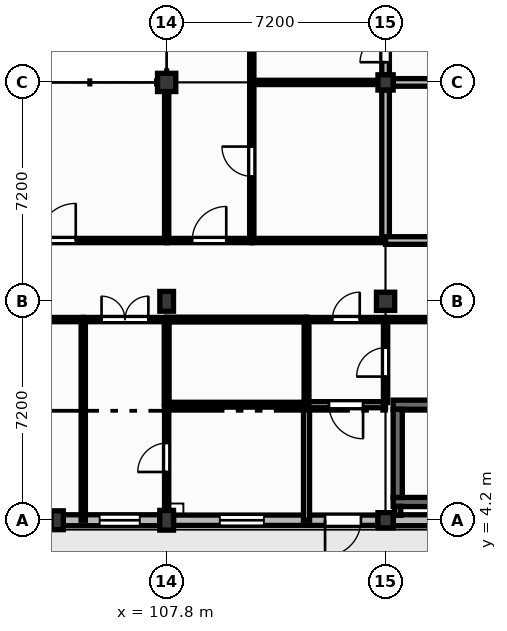
"""IFC4 building model, lengths in metres.
Left out: names, types, materials, properties, quantities, classifications, styles, units other than length and angle.
Written with IfcOpenShell. Run it as: python <this file> out.ifc"""

import sys

from ifc_helpers import new_model, si_unit, direction, frame, frame_2d, origin, origin_2d, place, context, subcontext, project, spatial, rectangle, extrude, element, fill, save


model = new_model("IFC4")
c1 = context("Model", 3, precision=1e-05, world=origin(), true_north=direction((0.0, 1.0)))
c2 = subcontext(c1, "Body", "Model", "MODEL_VIEW")
j1 = project(units=[si_unit("LENGTHUNIT", "METRE"), si_unit("PLANEANGLEUNIT", "RADIAN")], contexts=[c1])
p1 = place(None, origin())
s1 = spatial("IfcSite", under=j1, at=p1, CompositionType="ELEMENT")
p2 = place(p1, origin())
s2 = spatial("IfcBuilding", under=s1, at=p2, CompositionType="ELEMENT")
p3 = place(p2, origin())
s3 = spatial("IfcBuildingStorey", under=s2, at=p3, CompositionType="ELEMENT", Elevation=0.0)
for number, where, z_axis, x_axis in (
    (1, (107.8, 4.2, 0.0), (0.0, 0.0, 1.0), (1.0, 0.0, 0.0)),
    (2, (107.8, 11.4, 0.0), (0.0, 0.0, 1.0), (1.0, 0.0, 0.0)),
):
    element("IfcColumn", number, at=place(p3, frame(where, z_axis=z_axis, x_axis=x_axis)), inside=s3, PredefinedType="COLUMN", context=c2, shape_type="SweptSolid", body=[
        extrude(rectangle(XDim=0.45, YDim=0.65, at=origin_2d()), origin(), (0.0, 0.0, 1.0), 4.2),
    ])
p4 = place(p3, frame((107.8, 18.6, 0.0), z_axis=(0.0, 0.0, 1.0), x_axis=(1.0, 0.0, 0.0)))
e3 = element("IfcColumn", 3, at=p4, inside=s3, PredefinedType="COLUMN", context=c2, shape_type="SweptSolid", body=[
    extrude(rectangle(XDim=0.6, YDim=0.6, at=origin_2d()), origin(), (0.0, 0.0, 1.0), 4.2),
])
p5 = place(p3, frame((115.0, 4.2, 0.0), z_axis=(0.0, 0.0, 1.0), x_axis=(1.0, 0.0, 0.0)))
e4 = element("IfcColumn", 4, at=p5, inside=s3, PredefinedType="COLUMN", context=c2, shape_type="SweptSolid", body=[
    extrude(rectangle(XDim=0.5, YDim=0.5, at=origin_2d()), origin(), (0.0, 0.0, 1.0), 4.2),
])
p6 = place(p3, frame((115.0, 11.4, 0.0), z_axis=(0.0, 0.0, 1.0), x_axis=(1.0, 0.0, 0.0)))
e5 = element("IfcColumn", 5, at=p6, inside=s3, PredefinedType="COLUMN", context=c2, shape_type="SweptSolid", body=[
    extrude(rectangle(XDim=0.6, YDim=0.6, at=origin_2d()), origin(), (0.0, 0.0, 1.0), 4.2),
])
p7 = place(p3, frame((115.0, 18.6, 0.0), z_axis=(0.0, 0.0, 1.0), x_axis=(1.0, 0.0, 0.0)))
e6 = element("IfcColumn", 6, at=p7, inside=s3, PredefinedType="COLUMN", context=c2, shape_type="SweptSolid", body=[
    extrude(rectangle(XDim=0.5, YDim=0.5, at=origin_2d()), origin(), (0.0, 0.0, 1.0), 4.2),
])
p8 = place(p3, frame((104.2, 4.2, 0.0), z_axis=(0.0, 0.0, 1.0), x_axis=(1.0, 0.0, 0.0)))
e7 = element("IfcColumn", 7, at=p8, inside=s3, PredefinedType="PILASTER", context=c2, shape_type="SweptSolid", body=[
    extrude(rectangle(XDim=0.4, YDim=0.62, at=origin_2d()), origin(), (0.0, 0.0, 1.0), 4.2),
])
p9 = place(p3, frame((104.4, 4.2, 0.0), z_axis=(0.0, 0.0, 1.0), x_axis=(1.0, 0.0, 0.0)))
e8 = element("IfcWall", 8, at=p9, inside=s3, PredefinedType="SOLIDWALL", context=c2, shape_type="SweptSolid", body=[
    extrude(rectangle(XDim=3.175, YDim=0.36, at=frame_2d((1.587, 0.0))), origin(), (0.0, 0.0, 1.0), 3.68),
])
p10 = place(p9, frame((1.196, 0.0, 1.5)))
e9 = element("IfcOpeningElement", 9, at=p10, cuts=e8, PredefinedType="OPENING", context=c2, shape_type="SweptSolid", body=[
    extrude(rectangle(XDim=1.32, YDim=1.25, at=frame_2d((0.66, 0.625))), frame((0.0, 0.19, 0.0), z_axis=(0.0, -1.0, 0.0), x_axis=(1.0, 0.0, 0.0)), (0.0, 0.0, 1.0), 0.38),
])
p11 = place(p3, frame((108.025, 4.2, 0.0), z_axis=(0.0, 0.0, 1.0), x_axis=(1.0, 0.0, 0.0)))
e10 = element("IfcWall", 10, at=p11, inside=s3, PredefinedType="SOLIDWALL", context=c2, shape_type="SweptSolid", body=[
    extrude(rectangle(XDim=6.725, YDim=0.34, at=frame_2d((3.363, 0.0))), origin(), (0.0, 0.0, 1.0), 3.68),
])
p12 = place(p11, frame((4.985, 0.0, 0.0)))
e11 = element("IfcOpeningElement", 11, at=p12, cuts=e10, PredefinedType="OPENING", context=c2, shape_type="SweptSolid", body=[
    extrude(rectangle(XDim=1.18, YDim=2.2, at=frame_2d((0.59, 1.1))), frame((0.0, 0.18, 0.0), z_axis=(0.0, -1.0, 0.0), x_axis=(1.0, 0.0, 0.0)), (0.0, 0.0, 1.0), 0.36),
])
p13 = place(p11, frame((1.522, 0.0, 1.35)))
e12 = element("IfcOpeningElement", 12, at=p13, cuts=e10, PredefinedType="OPENING", context=c2, shape_type="SweptSolid", body=[
    extrude(rectangle(XDim=1.45, YDim=1.4, at=frame_2d((0.725, 0.7))), frame((0.0, 0.18, 0.0), z_axis=(0.0, -1.0, 0.0), x_axis=(1.0, 0.0, 0.0)), (0.0, 0.0, 1.0), 0.36),
])
p14 = place(p3, frame((115.25, 4.2, 0.0), z_axis=(0.0, 0.0, 1.0), x_axis=(1.0, 0.0, 0.0)))
e13 = element("IfcWall", 13, at=p14, inside=s3, PredefinedType="SOLIDWALL", context=c2, shape_type="SweptSolid", body=[
    extrude(rectangle(XDim=6.65, YDim=0.36, at=frame_2d((3.325, 0.0))), origin(), (0.0, 0.0, 1.0), 3.68),
])
for number, where, z_axis, x_axis in (
    (14, (115.25, 4.8, 0.0), (0.0, 0.0, 1.0), (1.0, 0.0, 0.0)),
    (15, (115.25, 8.0, 0.0), (0.0, 0.0, 1.0), (1.0, 0.0, 0.0)),
):
    element("IfcWall", number, at=place(p3, frame(where, z_axis=z_axis, x_axis=x_axis)), inside=s3, PredefinedType="SHEAR", context=c2, shape_type="SweptSolid", body=[
        extrude(rectangle(XDim=6.7, YDim=0.3, at=frame_2d((3.35, 0.0))), origin(), (0.0, 0.0, 1.0), 4.25),
    ])
p15 = place(p3, frame((115.4, 4.95, 0.0), z_axis=(0.0, 0.0, 1.0), x_axis=(0.0, 1.0, 0.0)))
e16 = element("IfcWall", 16, at=p15, inside=s3, PredefinedType="SHEAR", context=c2, shape_type="SweptSolid", body=[
    extrude(rectangle(XDim=2.9, YDim=0.3, at=frame_2d((1.45, 0.0))), origin(), (0.0, 0.0, 1.0), 4.25),
])
p16 = place(p3, frame((100.6, 10.8, 0.0), z_axis=(0.0, 0.0, 1.0), x_axis=(1.0, 0.0, 0.0)))
e17 = element("IfcWall", 17, at=p16, inside=s3, PredefinedType="PARTITIONING", context=c2, shape_type="SweptSolid", body=[
    extrude(rectangle(XDim=4.457, YDim=0.14, at=frame_2d((2.229, 0.0))), origin(), (0.0, 0.0, 1.0), 4.18),
])
p17 = place(p16, frame((1.698, 0.0, 0.0)))
e18 = element("IfcOpeningElement", 18, at=p17, cuts=e17, PredefinedType="OPENING", context=c2, shape_type="SweptSolid", body=[
    extrude(rectangle(XDim=1.06, YDim=2.15, at=frame_2d((0.53, 1.075))), frame((0.0, 0.08, 0.0), z_axis=(0.0, -1.0, 0.0), x_axis=(1.0, 0.0, 0.0)), (0.0, 0.0, 1.0), 0.16),
])
p18 = place(p3, frame((100.6, 13.4, 0.0), z_axis=(0.0, 0.0, 1.0), x_axis=(1.0, 0.0, 0.0)))
e19 = element("IfcWall", 19, at=p18, inside=s3, PredefinedType="PARTITIONING", context=c2, shape_type="SweptSolid", body=[
    extrude(rectangle(XDim=7.2, YDim=0.14, at=frame_2d((3.6, 0.0))), origin(), (0.0, 0.0, 1.0), 4.18),
])
p19 = place(p18, frame((2.99, 0.0, 0.0)))
e20 = element("IfcOpeningElement", 20, at=p19, cuts=e19, PredefinedType="OPENING", context=c2, shape_type="SweptSolid", body=[
    extrude(rectangle(XDim=1.22, YDim=2.1, at=frame_2d((0.61, 1.05))), frame((0.0, 0.08, 0.0), z_axis=(0.0, -1.0, 0.0), x_axis=(1.0, 0.0, 0.0)), (0.0, 0.0, 1.0), 0.16),
])
p20 = place(p3, frame((105.057, 4.2, 0.0), z_axis=(0.0, 0.0, 1.0), x_axis=(0.0, 1.0, 0.0)))
e21 = element("IfcWall", 21, at=p20, inside=s3, PredefinedType="PARTITIONING", context=c2, shape_type="SweptSolid", body=[
    extrude(rectangle(XDim=6.53, YDim=0.14, at=frame_2d((3.265, 0.0))), origin(), (0.0, 0.0, 1.0), 4.18),
])
p21 = place(p3, frame((105.057, 10.8, 0.0), z_axis=(0.0, 0.0, 1.0), x_axis=(1.0, 0.0, 0.0)))
e22 = element("IfcWall", 22, at=p21, inside=s3, PredefinedType="PARTITIONING", context=c2, shape_type="SweptSolid", body=[
    extrude(rectangle(XDim=2.743, YDim=0.14, at=frame_2d((1.372, 0.0))), origin(), (0.0, 0.0, 1.0), 4.18),
])
p22 = place(p21, frame((0.602, 0.0, 0.0)))
e23 = element("IfcOpeningElement", 23, at=p22, cuts=e22, PredefinedType="OPENING", context=c2, shape_type="SweptSolid", body=[
    extrude(rectangle(XDim=1.54, YDim=2.25, at=frame_2d((0.77, 1.125))), frame((0.0, 0.08, 0.0), z_axis=(0.0, -1.0, 0.0), x_axis=(1.0, 0.0, 0.0)), (0.0, 0.0, 1.0), 0.16),
])
p23 = place(p3, frame((107.8, 4.525, 0.0), z_axis=(0.0, 0.0, 1.0), x_axis=(0.0, 1.0, 0.0)))
e24 = element("IfcWall", 24, at=p23, inside=s3, PredefinedType="PARTITIONING", context=c2, shape_type="SweptSolid", body=[
    extrude(rectangle(XDim=3.475, YDim=0.14, at=frame_2d((1.738, 0.0))), origin(), (0.0, 0.0, 1.0), 3.5),
])
p24 = place(p23, frame((1.262, 0.0, 0.0)))
e25 = element("IfcOpeningElement", 25, at=p24, cuts=e24, PredefinedType="OPENING", context=c2, shape_type="SweptSolid", body=[
    extrude(rectangle(XDim=0.95, YDim=2.1, at=frame_2d((0.475, 1.05))), frame((0.0, 0.08, 0.0), z_axis=(0.0, -1.0, 0.0), x_axis=(1.0, 0.0, 0.0)), (0.0, 0.0, 1.0), 0.16),
])
p25 = place(p3, frame((107.8, 13.47, 0.0), z_axis=(0.0, 0.0, 1.0), x_axis=(0.0, 1.0, 0.0)))
e26 = element("IfcWall", 26, at=p25, inside=s3, PredefinedType="PARTITIONING", context=c2, shape_type="SweptSolid", body=[
    extrude(rectangle(XDim=4.83, YDim=0.14, at=frame_2d((2.415, 0.0))), origin(), (0.0, 0.0, 1.0), 3.5),
])
p26 = place(p3, frame((107.8, 13.4, 0.0), z_axis=(0.0, 0.0, 1.0), x_axis=(1.0, 0.0, 0.0)))
e27 = element("IfcWall", 27, at=p26, inside=s3, PredefinedType="PARTITIONING", context=c2, shape_type="SweptSolid", body=[
    extrude(rectangle(XDim=2.8, YDim=0.14, at=frame_2d((1.4, 0.0))), origin(), (0.0, 0.0, 1.0), 4.18),
])
p27 = place(p26, frame((0.84, 0.0, 0.0)))
e28 = element("IfcOpeningElement", 28, at=p27, cuts=e27, PredefinedType="OPENING", context=c2, shape_type="SweptSolid", body=[
    extrude(rectangle(XDim=1.12, YDim=2.15, at=frame_2d((0.56, 1.075))), frame((0.0, 0.08, 0.0), z_axis=(0.0, -1.0, 0.0), x_axis=(1.0, 0.0, 0.0)), (0.0, 0.0, 1.0), 0.16),
])
p28 = place(p3, frame((110.6, 13.47, 0.0), z_axis=(0.0, 0.0, 1.0), x_axis=(0.0, 1.0, 0.0)))
e29 = element("IfcWall", 29, at=p28, inside=s3, PredefinedType="PARTITIONING", context=c2, shape_type="SweptSolid", body=[
    extrude(rectangle(XDim=5.06, YDim=0.14, at=frame_2d((2.53, 0.0))), origin(), (0.0, 0.0, 1.0), 4.18),
])
p29 = place(p28, frame((2.04, 0.0, 0.0)))
e30 = element("IfcOpeningElement", 30, at=p29, cuts=e29, PredefinedType="OPENING", context=c2, shape_type="SweptSolid", body=[
    extrude(rectangle(XDim=0.98, YDim=2.15, at=frame_2d((0.49, 1.075))), frame((0.0, 0.08, 0.0), z_axis=(0.0, -1.0, 0.0), x_axis=(1.0, 0.0, 0.0)), (0.0, 0.0, 1.0), 0.16),
])
p30 = place(p3, frame((110.6, 13.4, 0.0), z_axis=(0.0, 0.0, 1.0), x_axis=(1.0, 0.0, 0.0)))
e31 = element("IfcWall", 31, at=p30, inside=s3, PredefinedType="PARTITIONING", context=c2, shape_type="SweptSolid", body=[
    extrude(rectangle(XDim=4.4, YDim=0.14, at=frame_2d((2.2, 0.0))), origin(), (0.0, 0.0, 1.0), 4.18),
])
p31 = place(p3, frame((110.6, 18.67, 0.0), z_axis=(0.0, 0.0, 1.0), x_axis=(0.0, 1.0, 0.0)))
e32 = element("IfcWall", 32, at=p31, inside=s3, PredefinedType="PARTITIONING", context=c2, shape_type="SweptSolid", body=[
    extrude(rectangle(XDim=8.46, YDim=0.14, at=frame_2d((4.23, 0.0))), origin(), (0.0, 0.0, 1.0), 4.18),
])
p32 = place(p31, frame((3.67, 0.0, 0.0)))
e33 = element("IfcOpeningElement", 33, at=p32, cuts=e32, PredefinedType="OPENING", context=c2, shape_type="SweptSolid", body=[
    extrude(rectangle(XDim=1.12, YDim=2.15, at=frame_2d((0.56, 1.075))), frame((0.0, 0.08, 0.0), z_axis=(0.0, -1.0, 0.0), x_axis=(1.0, 0.0, 0.0)), (0.0, 0.0, 1.0), 0.16),
])
p33 = place(p3, frame((110.6, 18.6, 0.0), z_axis=(0.0, 0.0, 1.0), x_axis=(1.0, 0.0, 0.0)))
e34 = element("IfcWall", 34, at=p33, inside=s3, PredefinedType="PARTITIONING", context=c2, shape_type="SweptSolid", body=[
    extrude(rectangle(XDim=4.15, YDim=0.14, at=frame_2d((2.075, 0.0))), origin(), (0.0, 0.0, 1.0), 3.25),
])
p34 = place(p3, frame((112.4, 4.2, 0.0), z_axis=(0.0, 0.0, 1.0), x_axis=(0.0, 1.0, 0.0)))
e35 = element("IfcWall", 35, at=p34, inside=s3, PredefinedType="PARTITIONING", context=c2, shape_type="SweptSolid", body=[
    extrude(rectangle(XDim=3.73, YDim=0.2, at=frame_2d((1.865, 0.0))), origin(), (0.0, 0.0, 1.0), 4.18),
])
p35 = place(p3, frame((112.4, 8.0, 0.0), z_axis=(0.0, 0.0, 1.0), x_axis=(1.0, 0.0, 0.0)))
e36 = element("IfcWall", 36, at=p35, inside=s3, PredefinedType="PARTITIONING", context=c2, shape_type="SweptSolid", body=[
    extrude(rectangle(XDim=2.6, YDim=0.2, at=frame_2d((1.3, 0.0))), origin(), (0.0, 0.0, 1.0), 4.18),
])
p36 = place(p35, frame((0.74, 0.0, 0.0)))
e37 = element("IfcOpeningElement", 37, at=p36, cuts=e36, PredefinedType="OPENING", context=c2, shape_type="SweptSolid", body=[
    extrude(rectangle(XDim=1.12, YDim=2.1, at=frame_2d((0.56, 1.05))), frame((0.0, 0.11, 0.0), z_axis=(0.0, -1.0, 0.0), x_axis=(1.0, 0.0, 0.0)), (0.0, 0.0, 1.0), 0.22),
])
p37 = place(p3, frame((112.4, 10.8, 0.0), z_axis=(0.0, 0.0, 1.0), x_axis=(1.0, 0.0, 0.0)))
e38 = element("IfcWall", 38, at=p37, inside=s3, PredefinedType="PARTITIONING", context=c2, shape_type="SweptSolid", body=[
    extrude(rectangle(XDim=2.6, YDim=0.14, at=frame_2d((1.3, 0.0))), origin(), (0.0, 0.0, 1.0), 4.18),
])
p38 = place(p37, frame((0.85, 0.0, 0.0)))
e39 = element("IfcOpeningElement", 39, at=p38, cuts=e38, PredefinedType="OPENING", context=c2, shape_type="SweptSolid", body=[
    extrude(rectangle(XDim=0.9, YDim=2.1, at=frame_2d((0.45, 1.05))), frame((0.0, 0.08, 0.0), z_axis=(0.0, -1.0, 0.0), x_axis=(1.0, 0.0, 0.0)), (0.0, 0.0, 1.0), 0.16),
])
p39 = place(p3, frame((115.0, 8.07, 0.0), z_axis=(0.0, 0.0, 1.0), x_axis=(0.0, 1.0, 0.0)))
e40 = element("IfcWall", 40, at=p39, inside=s3, PredefinedType="PARTITIONING", context=c2, shape_type="SweptSolid", body=[
    extrude(rectangle(XDim=2.66, YDim=0.14, at=frame_2d((1.33, 0.0))), origin(), (0.0, 0.0, 1.0), 3.5),
])
p40 = place(p39, frame((0.855, 0.0, 0.0)))
e41 = element("IfcOpeningElement", 41, at=p40, cuts=e40, PredefinedType="OPENING", context=c2, shape_type="SweptSolid", body=[
    extrude(rectangle(XDim=0.95, YDim=2.1, at=frame_2d((0.475, 1.05))), frame((0.0, 0.08, 0.0), z_axis=(0.0, -1.0, 0.0), x_axis=(1.0, 0.0, 0.0)), (0.0, 0.0, 1.0), 0.16),
])
p41 = place(p3, frame((115.0, 10.8, 0.0), z_axis=(0.0, 0.0, 1.0), x_axis=(1.0, 0.0, 0.0)))
e42 = element("IfcWall", 42, at=p41, inside=s3, PredefinedType="PARTITIONING", context=c2, shape_type="SweptSolid", body=[
    extrude(rectangle(XDim=6.8, YDim=0.14, at=frame_2d((3.4, 0.0))), origin(), (0.0, 0.0, 1.0), 4.18),
])
p42 = place(p41, frame((2.91, 0.0, 0.0)))
e43 = element("IfcOpeningElement", 43, at=p42, cuts=e42, PredefinedType="OPENING", context=c2, shape_type="SweptSolid", body=[
    extrude(rectangle(XDim=0.98, YDim=2.15, at=frame_2d((0.49, 1.075))), frame((0.0, 0.08, 0.0), z_axis=(0.0, -1.0, 0.0), x_axis=(1.0, 0.0, 0.0)), (0.0, 0.0, 1.0), 0.16),
])
p43 = place(p3, frame((115.0, 13.47, 0.0), z_axis=(0.0, 0.0, 1.0), x_axis=(0.0, 1.0, 0.0)))
e44 = element("IfcWall", 44, at=p43, inside=s3, PredefinedType="SOLIDWALL", context=c2, shape_type="SweptSolid", body=[
    extrude(rectangle(XDim=4.88, YDim=0.25, at=frame_2d((2.44, 0.0))), origin(), (0.0, 0.0, 1.0), 3.5),
])
p44 = place(p3, frame((115.0, 13.4, 0.0), z_axis=(0.0, 0.0, 1.0), x_axis=(1.0, 0.0, 0.0)))
e45 = element("IfcWall", 45, at=p44, inside=s3, PredefinedType="SOLIDWALL", context=c2, shape_type="SweptSolid", body=[
    extrude(rectangle(XDim=6.8, YDim=0.25, at=frame_2d((3.4, 0.0))), origin(), (0.0, 0.0, 1.0), 4.18),
])
p45 = place(p44, frame((2.86, 0.0, 0.0)))
e46 = element("IfcOpeningElement", 46, at=p45, cuts=e45, PredefinedType="OPENING", context=c2, shape_type="SweptSolid", body=[
    extrude(rectangle(XDim=1.08, YDim=2.15, at=frame_2d((0.54, 1.075))), frame((0.0, 0.135, 0.0), z_axis=(0.0, -1.0, 0.0), x_axis=(1.0, 0.0, 0.0)), (0.0, 0.0, 1.0), 0.27),
])
p46 = place(p44, frame((4.34, 0.0, 1.05)))
e47 = element("IfcOpeningElement", 47, at=p46, cuts=e45, PredefinedType="OPENING", context=c2, shape_type="SweptSolid", body=[
    extrude(rectangle(XDim=1.2, YDim=1.1, at=frame_2d((0.6, 0.55))), frame((0.0, 0.135, 0.0), z_axis=(0.0, -1.0, 0.0), x_axis=(1.0, 0.0, 0.0)), (0.0, 0.0, 1.0), 0.27),
])
p47 = place(p3, frame((115.0, 18.85, 0.0), z_axis=(0.0, 0.0, 1.0), x_axis=(0.0, 1.0, 0.0)))
e48 = element("IfcWall", 48, at=p47, inside=s3, PredefinedType="SOLIDWALL", context=c2, shape_type="SweptSolid", body=[
    extrude(rectangle(XDim=2.509, YDim=0.25, at=frame_2d((1.254, 0.0))), origin(), (0.0, 0.0, 1.0), 3.4),
])
p48 = place(p47, frame((0.415, 0.0, 0.0)))
e49 = element("IfcOpeningElement", 49, at=p48, cuts=e48, PredefinedType="OPENING", context=c2, shape_type="SweptSolid", body=[
    extrude(rectangle(XDim=1.68, YDim=2.3, at=frame_2d((0.84, 1.15))), frame((0.0, 0.135, 0.0), z_axis=(0.0, -1.0, 0.0), x_axis=(1.0, 0.0, 0.0)), (0.0, 0.0, 1.0), 0.27),
])
p49 = place(p3, frame((115.25, 18.6, 0.0), z_axis=(0.0, 0.0, 1.0), x_axis=(1.0, 0.0, 0.0)))
e50 = element("IfcWall", 50, at=p49, inside=s3, PredefinedType="SOLIDWALL", context=c2, shape_type="SweptSolid", body=[
    extrude(rectangle(XDim=6.55, YDim=0.25, at=frame_2d((3.275, 0.0))), origin(), (0.0, 0.0, 1.0), 3.25),
])
p50 = place(p3, frame((115.4, 4.36, 0.0), z_axis=(0.0, 0.0, 1.0), x_axis=(0.0, 1.0, 0.0)))
e51 = element("IfcWall", 51, at=p50, inside=s3, PredefinedType="PARTITIONING", context=c2, shape_type="SweptSolid", body=[
    extrude(rectangle(XDim=0.3, YDim=0.2, at=frame_2d((0.15, 0.0))), origin(), (0.0, 0.0, 1.0), 4.18),
])
p51 = place(p3, frame((107.8, 10.8, 0.0), z_axis=(0.0, 0.0, 1.0), x_axis=(1.0, 0.0, 0.0)))
e52 = element("IfcWall", 52, at=p51, inside=s3, PredefinedType="PARTITIONING", context=c2, shape_type="SweptSolid", body=[
    extrude(rectangle(XDim=4.6, YDim=0.16, at=frame_2d((2.3, 0.0))), origin(), (0.0, 0.0, 1.0), 4.18),
])
p52 = place(p3, frame((112.4, 8.07, 0.0), z_axis=(0.0, 0.0, 1.0), x_axis=(0.0, 1.0, 0.0)))
e53 = element("IfcWall", 53, at=p52, inside=s3, PredefinedType="PARTITIONING", context=c2, shape_type="SweptSolid", body=[
    extrude(rectangle(XDim=2.66, YDim=0.16, at=frame_2d((1.33, 0.0))), origin(), (0.0, 0.0, 1.0), 4.18),
])
p53 = place(p3, frame((107.8, 8.0, 0.0), z_axis=(0.0, 0.0, 1.0), x_axis=(0.0, 1.0, 0.0)))
e54 = element("IfcWall", 54, at=p53, inside=s3, PredefinedType="PARTITIONING", context=c2, shape_type="SweptSolid", body=[
    extrude(rectangle(XDim=2.73, YDim=0.16, at=frame_2d((1.365, 0.0))), origin(), (0.0, 0.0, 1.0), 3.5),
])
p54 = place(p3, frame((112.4, 8.0, 0.0), z_axis=(0.0, 0.0, 1.0), x_axis=(-1.0, 0.0, 0.0)))
e55 = element("IfcWall", 55, at=p54, inside=s3, PredefinedType="PARTITIONING", context=c2, shape_type="SweptSolid", body=[
    extrude(rectangle(XDim=4.6, YDim=0.16, at=frame_2d((2.3, 0.0))), origin(), (0.0, 0.0, 1.0), 4.18),
])
p55 = place(p10, origin())
e56 = element("IfcWindow", 56, at=p55, inside=s3, PartitioningType="SINGLE_PANEL", PredefinedType="WINDOW", context=c2, shape_type="SweptSolid", body=[
    extrude(rectangle(XDim=1.32, YDim=1.25, at=frame_2d((0.66, 0.625))), frame((0.0, 0.03, 0.0), z_axis=(0.0, -1.0, 0.0), x_axis=(1.0, 0.0, 0.0)), (0.0, 0.0, 1.0), 0.06),
])
fill(e9, e56)
p56 = place(p12, frame((1.18, 0.0, 0.0), z_axis=(0.0, 0.0, 1.0), x_axis=(-1.0, 0.0, 0.0)))
e57 = element("IfcDoor", 57, at=p56, inside=s3, OperationType="SINGLE_SWING_RIGHT", PredefinedType="DOOR", context=c2, shape_type="SweptSolid", body=[
    extrude(rectangle(XDim=1.18, YDim=2.2, at=frame_2d((0.59, 1.1))), frame((0.0, 0.025, 0.0), z_axis=(0.0, -1.0, 0.0), x_axis=(1.0, 0.0, 0.0)), (0.0, 0.0, 1.0), 0.05),
])
fill(e11, e57)
p57 = place(p13, origin())
e58 = element("IfcWindow", 58, at=p57, inside=s3, PartitioningType="SINGLE_PANEL", PredefinedType="WINDOW", context=c2, shape_type="SweptSolid", body=[
    extrude(rectangle(XDim=1.45, YDim=1.4, at=frame_2d((0.725, 0.7))), frame((0.0, 0.03, 0.0), z_axis=(0.0, -1.0, 0.0), x_axis=(1.0, 0.0, 0.0)), (0.0, 0.0, 1.0), 0.06),
])
fill(e12, e58)
p58 = place(p36, frame((1.12, 0.0, 0.0), z_axis=(0.0, 0.0, 1.0), x_axis=(-1.0, 0.0, 0.0)))
e59 = element("IfcDoor", 59, at=p58, inside=s3, OperationType="SINGLE_SWING_LEFT", PredefinedType="DOOR", context=c2, shape_type="SweptSolid", body=[
    extrude(rectangle(XDim=1.12, YDim=2.1, at=frame_2d((0.56, 1.05))), frame((0.0, 0.025, 0.0), z_axis=(0.0, -1.0, 0.0), x_axis=(1.0, 0.0, 0.0)), (0.0, 0.0, 1.0), 0.05),
])
fill(e37, e59)
p59 = place(p38, origin())
e60 = element("IfcDoor", 60, at=p59, inside=s3, OperationType="SINGLE_SWING_RIGHT", PredefinedType="DOOR", context=c2, shape_type="SweptSolid", body=[
    extrude(rectangle(XDim=0.9, YDim=2.1, at=frame_2d((0.45, 1.05))), frame((0.0, 0.025, 0.0), z_axis=(0.0, -1.0, 0.0), x_axis=(1.0, 0.0, 0.0)), (0.0, 0.0, 1.0), 0.05),
])
fill(e39, e60)
p60 = place(p27, origin())
e61 = element("IfcDoor", 61, at=p60, inside=s3, OperationType="SINGLE_SWING_RIGHT", PredefinedType="DOOR", context=c2, shape_type="SweptSolid", body=[
    extrude(rectangle(XDim=1.12, YDim=2.15, at=frame_2d((0.56, 1.075))), frame((0.0, 0.025, 0.0), z_axis=(0.0, -1.0, 0.0), x_axis=(1.0, 0.0, 0.0)), (0.0, 0.0, 1.0), 0.05),
])
fill(e28, e61)
p61 = place(p40, origin())
e62 = element("IfcDoor", 62, at=p61, inside=s3, OperationType="SINGLE_SWING_LEFT", PredefinedType="DOOR", context=c2, shape_type="SweptSolid", body=[
    extrude(rectangle(XDim=0.95, YDim=2.1, at=frame_2d((0.475, 1.05))), frame((0.0, 0.025, 0.0), z_axis=(0.0, -1.0, 0.0), x_axis=(1.0, 0.0, 0.0)), (0.0, 0.0, 1.0), 0.05),
])
fill(e41, e62)
p62 = place(p22, origin())
e63 = element("IfcDoor", 63, at=p62, inside=s3, OperationType="DOUBLE_DOOR_SINGLE_SWING", PredefinedType="DOOR", context=c2, shape_type="SweptSolid", body=[
    extrude(rectangle(XDim=1.54, YDim=2.25, at=frame_2d((0.77, 1.125))), frame((0.0, 0.025, 0.0), z_axis=(0.0, -1.0, 0.0), x_axis=(1.0, 0.0, 0.0)), (0.0, 0.0, 1.0), 0.05),
])
fill(e23, e63)
p63 = place(p19, origin())
e64 = element("IfcDoor", 64, at=p63, inside=s3, OperationType="SINGLE_SWING_RIGHT", PredefinedType="DOOR", context=c2, shape_type="SweptSolid", body=[
    extrude(rectangle(XDim=1.22, YDim=2.1, at=frame_2d((0.61, 1.05))), frame((0.0, 0.025, 0.0), z_axis=(0.0, -1.0, 0.0), x_axis=(1.0, 0.0, 0.0)), (0.0, 0.0, 1.0), 0.05),
])
fill(e20, e64)
p64 = place(p24, origin())
e65 = element("IfcDoor", 65, at=p64, inside=s3, OperationType="SINGLE_SWING_LEFT", PredefinedType="DOOR", context=c2, shape_type="SweptSolid", body=[
    extrude(rectangle(XDim=0.95, YDim=2.1, at=frame_2d((0.475, 1.05))), frame((0.0, 0.025, 0.0), z_axis=(0.0, -1.0, 0.0), x_axis=(1.0, 0.0, 0.0)), (0.0, 0.0, 1.0), 0.05),
])
fill(e25, e65)
p65 = place(p29, origin())
e66 = element("IfcDoor", 66, at=p65, inside=s3, OperationType="SINGLE_SWING_RIGHT", PredefinedType="DOOR", context=c2, shape_type="SweptSolid", body=[
    extrude(rectangle(XDim=0.98, YDim=2.15, at=frame_2d((0.49, 1.075))), frame((0.0, 0.025, 0.0), z_axis=(0.0, -1.0, 0.0), x_axis=(1.0, 0.0, 0.0)), (0.0, 0.0, 1.0), 0.05),
])
fill(e30, e66)
p66 = place(p48, origin())
e67 = element("IfcDoor", 67, at=p66, inside=s3, OperationType="DOUBLE_DOOR_SINGLE_SWING", PredefinedType="DOOR", context=c2, shape_type="SweptSolid", body=[
    extrude(rectangle(XDim=1.68, YDim=2.3, at=frame_2d((0.84, 1.15))), frame((0.0, 0.025, 0.0), z_axis=(0.0, -1.0, 0.0), x_axis=(1.0, 0.0, 0.0)), (0.0, 0.0, 1.0), 0.05),
])
fill(e49, e67)
save(model, sys.argv[1])
